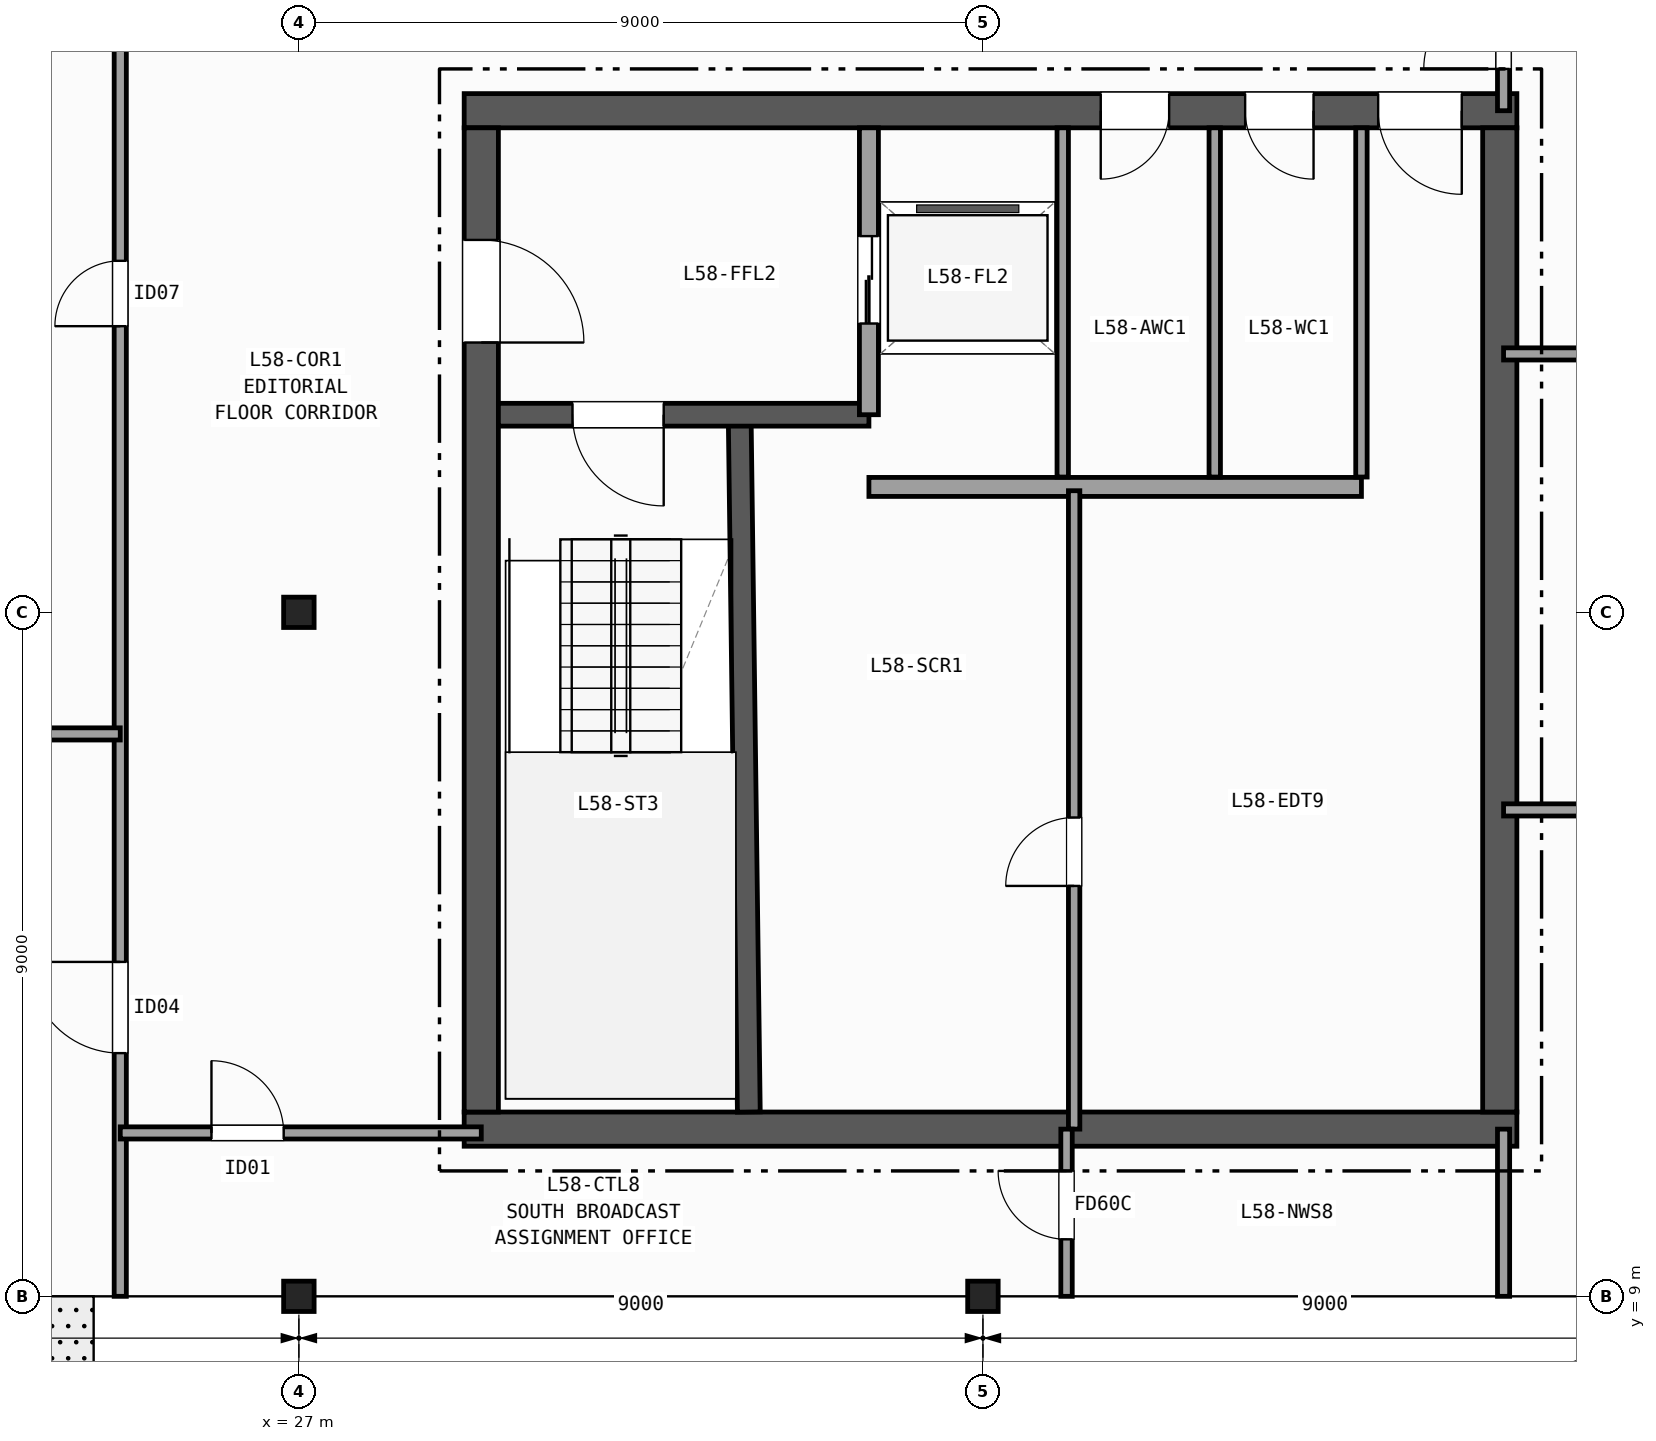
"""IFC4 building model, lengths in metres.
Left out: names, types, materials, properties, quantities, classifications, styles, units other than length and angle.
Written with IfcOpenShell. Run it as: python <this file> out.ifc"""

import sys

from ifc_helpers import new_model, si_unit, direction, frame, frame_2d, origin, origin_2d, place, context, subcontext, project, spatial, rectangle, i_section, extrude, element, fill, save


model = new_model("IFC4")
c1 = context("Model", 3, precision=1e-05, world=origin(), true_north=direction((0.0, 1.0)))
c2 = subcontext(c1, "Body", "Model", "MODEL_VIEW")
j1 = project(units=[si_unit("LENGTHUNIT", "METRE"), si_unit("PLANEANGLEUNIT", "RADIAN")], contexts=[c1])
p1 = place(None, origin())
s1 = spatial("IfcSite", under=j1, at=p1, CompositionType="ELEMENT")
p2 = place(p1, origin())
s2 = spatial("IfcBuilding", under=s1, at=p2, CompositionType="ELEMENT")
p3 = place(p2, frame((0.0, 0.0, 232.1)))
s3 = spatial("IfcBuildingStorey", under=s2, at=p3, CompositionType="ELEMENT", Elevation=232.1)
for number, where, z_axis, x_axis in (
    (1, (27.0, 9.0, 0.0), (0.0, 0.0, 1.0), (1.0, 0.0, 0.0)),
    (2, (27.0, 18.0, 0.0), (0.0, 0.0, 1.0), (1.0, 0.0, 0.0)),
    (3, (36.0, 9.0, 0.0), (0.0, 0.0, 1.0), (1.0, 0.0, 0.0)),
):
    element("IfcColumn", number, at=place(p3, frame(where, z_axis=z_axis, x_axis=x_axis)), inside=s3, PredefinedType="COLUMN", context=c2, shape_type="SweptSolid", body=[
        extrude(i_section(OverallWidth=0.401, OverallDepth=0.399, WebThickness=0.025, FlangeThickness=0.04, FilletRadius=0.015, at=origin_2d()), origin(), (0.0, 0.0, 1.0), 3.7),
    ])
p4 = place(p3, frame((29.175, 11.2, 0.0), z_axis=(0.0, 0.0, 1.0), x_axis=(1.0, 0.0, 0.0)))
e4 = element("IfcWall", 4, at=p4, inside=s3, PredefinedType="SHEAR", context=c2, shape_type="SweptSolid", body=[
    extrude(rectangle(XDim=13.85, YDim=0.45, at=frame_2d((6.925, 0.0))), origin(), (0.0, 0.0, 1.0), 3.37),
])
p5 = place(p3, frame((43.025, 24.6, 0.0), z_axis=(0.0, 0.0, 1.0), x_axis=(-1.0, 0.0, 0.0)))
e5 = element("IfcWall", 5, at=p5, inside=s3, PredefinedType="SHEAR", context=c2, shape_type="SweptSolid", body=[
    extrude(rectangle(XDim=13.85, YDim=0.45, at=frame_2d((6.925, 0.0))), origin(), (0.0, 0.0, 1.0), 3.37),
])
p6 = place(p5, frame((0.725, 0.0, 0.0)))
e6 = element("IfcOpeningElement", 6, at=p6, cuts=e5, PredefinedType="OPENING", context=c2, shape_type="SweptSolid", body=[
    extrude(rectangle(XDim=1.1, YDim=2.15, at=frame_2d((0.55, 1.075))), frame((0.0, 0.235, 0.0), z_axis=(0.0, -1.0, 0.0), x_axis=(1.0, 0.0, 0.0)), (0.0, 0.0, 1.0), 0.47),
])
p7 = place(p5, frame((2.675, 0.0, 0.0)))
e7 = element("IfcOpeningElement", 7, at=p7, cuts=e5, PredefinedType="OPENING", context=c2, shape_type="SweptSolid", body=[
    extrude(rectangle(XDim=0.9, YDim=2.1, at=frame_2d((0.45, 1.05))), frame((0.0, 0.235, 0.0), z_axis=(0.0, -1.0, 0.0), x_axis=(1.0, 0.0, 0.0)), (0.0, 0.0, 1.0), 0.47),
])
p8 = place(p5, frame((4.575, 0.0, 0.0)))
e8 = element("IfcOpeningElement", 8, at=p8, cuts=e5, PredefinedType="OPENING", context=c2, shape_type="SweptSolid", body=[
    extrude(rectangle(XDim=0.9, YDim=2.1, at=frame_2d((0.45, 1.05))), frame((0.0, 0.235, 0.0), z_axis=(0.0, -1.0, 0.0), x_axis=(1.0, 0.0, 0.0)), (0.0, 0.0, 1.0), 0.47),
])
p9 = place(p3, frame((29.4, 24.375, 0.0), z_axis=(0.0, 0.0, 1.0), x_axis=(0.0, -1.0, 0.0)))
e9 = element("IfcWall", 9, at=p9, inside=s3, PredefinedType="SHEAR", context=c2, shape_type="SweptSolid", body=[
    extrude(rectangle(XDim=12.95, YDim=0.45, at=frame_2d((6.475, 0.0))), origin(), (0.0, 0.0, 1.0), 3.37),
])
p10 = place(p9, frame((1.475, 0.0, 0.0)))
e10 = element("IfcOpeningElement", 10, at=p10, cuts=e9, PredefinedType="OPENING", context=c2, shape_type="SweptSolid", body=[
    extrude(rectangle(XDim=1.35, YDim=2.15, at=frame_2d((0.675, 1.075))), frame((0.0, 0.235, 0.0), z_axis=(0.0, -1.0, 0.0), x_axis=(1.0, 0.0, 0.0)), (0.0, 0.0, 1.0), 0.47),
])
p11 = place(p3, frame((42.8, 11.425, 0.0), z_axis=(0.0, 0.0, 1.0), x_axis=(0.0, 1.0, 0.0)))
e11 = element("IfcWall", 11, at=p11, inside=s3, PredefinedType="SHEAR", context=c2, shape_type="SweptSolid", body=[
    extrude(rectangle(XDim=12.95, YDim=0.45, at=frame_2d((6.475, 0.0))), origin(), (0.0, 0.0, 1.0), 3.37),
])
p12 = place(p3, frame((32.92, 11.425, 0.0), z_axis=(0.0, 0.0, 1.0), x_axis=(-0.013135638869, 0.999913723774, 0.0)))
e12 = element("IfcWall", 12, at=p12, inside=s3, PredefinedType="SHEAR", context=c2, shape_type="SweptSolid", body=[
    extrude(rectangle(XDim=9.126, YDim=0.3, at=frame_2d((4.563, 0.0))), origin(), (0.0, 0.0, 1.0), 3.37),
])
p13 = place(p3, frame((34.5, 20.6, 0.0), z_axis=(0.0, 0.0, 1.0), x_axis=(-1.0, 0.0, 0.0)))
e13 = element("IfcWall", 13, at=p13, inside=s3, PredefinedType="SHEAR", context=c2, shape_type="SweptSolid", body=[
    extrude(rectangle(XDim=4.875, YDim=0.3, at=frame_2d((2.438, 0.0))), origin(), (0.0, 0.0, 1.0), 3.37),
])
p14 = place(p13, frame((2.7, 0.0, 0.0)))
e14 = element("IfcOpeningElement", 14, at=p14, cuts=e13, PredefinedType="OPENING", context=c2, shape_type="SweptSolid", body=[
    extrude(rectangle(XDim=1.2, YDim=2.15, at=frame_2d((0.6, 1.075))), frame((0.0, 0.16, 0.0), z_axis=(0.0, -1.0, 0.0), x_axis=(1.0, 0.0, 0.0)), (0.0, 0.0, 1.0), 0.32),
])
p15 = place(p3, frame((34.5, 20.6, 0.0), z_axis=(0.0, 0.0, 1.0), x_axis=(0.0, 1.0, 0.0)))
e15 = element("IfcWall", 15, at=p15, inside=s3, PredefinedType="PARTITIONING", context=c2, shape_type="SweptSolid", body=[
    extrude(rectangle(XDim=3.775, YDim=0.25, at=frame_2d((1.887, 0.0))), origin(), (0.0, 0.0, 1.0), 3.37),
])
p16 = place(p15, frame((1.2, 0.0, 0.0)))
e16 = element("IfcOpeningElement", 16, at=p16, cuts=e15, PredefinedType="OPENING", context=c2, shape_type="SweptSolid", body=[
    extrude(rectangle(XDim=1.15, YDim=2.15, at=frame_2d((0.575, 1.075))), frame((0.0, 0.135, 0.0), z_axis=(0.0, -1.0, 0.0), x_axis=(1.0, 0.0, 0.0)), (0.0, 0.0, 1.0), 0.27),
])
p17 = place(p3, frame((34.5, 19.65, 0.0), z_axis=(0.0, 0.0, 1.0), x_axis=(1.0, 0.0, 0.0)))
e17 = element("IfcWall", 17, at=p17, inside=s3, PredefinedType="PARTITIONING", context=c2, shape_type="SweptSolid", body=[
    extrude(rectangle(XDim=6.48, YDim=0.25, at=frame_2d((3.24, 0.0))), origin(), (0.0, 0.0, 1.0), 3.37),
])
p18 = place(p3, frame((37.2, 11.2, 0.0), z_axis=(0.0, 0.0, 1.0), x_axis=(0.0, 1.0, 0.0)))
e18 = element("IfcWall", 18, at=p18, inside=s3, PredefinedType="PARTITIONING", context=c2, shape_type="SweptSolid", body=[
    extrude(rectangle(XDim=8.4, YDim=0.15, at=frame_2d((4.2, 0.0))), origin(), (0.0, 0.0, 1.0), 2.739),
])
p19 = place(p18, frame((3.2, 0.0, 0.0)))
e19 = element("IfcOpeningElement", 19, at=p19, cuts=e18, PredefinedType="OPENING", context=c2, shape_type="SweptSolid", body=[
    extrude(rectangle(XDim=0.9, YDim=2.1, at=frame_2d((0.45, 1.05))), frame((0.0, 0.085, 0.0), z_axis=(0.0, -1.0, 0.0), x_axis=(1.0, 0.0, 0.0)), (0.0, 0.0, 1.0), 0.17),
])
for number, where, z_axis, x_axis in (
    (20, (37.05, 19.78, 0.0), (0.0, 0.0, 1.0), (0.0, 1.0, 0.0)),
    (21, (39.05, 19.78, 0.0), (0.0, 0.0, 1.0), (0.0, 1.0, 0.0)),
    (22, (40.98, 19.78, 0.0), (0.0, 0.0, 1.0), (0.0, 1.0, 0.0)),
):
    element("IfcWall", number, at=place(p3, frame(where, z_axis=z_axis, x_axis=x_axis)), inside=s3, PredefinedType="PARTITIONING", context=c2, shape_type="SweptSolid", body=[
        extrude(rectangle(XDim=4.595, YDim=0.15, at=frame_2d((2.297, 0.0))), origin(), (0.0, 0.0, 1.0), 3.37),
    ])
p20 = place(p3, frame((24.65, 9.0, 0.0), z_axis=(0.0, 0.0, 1.0), x_axis=(0.0, 1.0, 0.0)))
e23 = element("IfcWall", 23, at=p20, inside=s3, PredefinedType="PARTITIONING", context=c2, shape_type="SweptSolid", body=[
    extrude(rectangle(XDim=19.2, YDim=0.16, at=frame_2d((9.6, 0.0))), origin(), (0.0, 0.0, 1.0), 2.657),
])
p21 = place(p20, frame((3.2, 0.0, 0.0)))
e24 = element("IfcOpeningElement", 24, at=p21, cuts=e23, PredefinedType="OPENING", context=c2, shape_type="SweptSolid", body=[
    extrude(rectangle(XDim=1.2, YDim=2.15, at=frame_2d((0.6, 1.075))), frame((0.0, 0.09, 0.0), z_axis=(0.0, -1.0, 0.0), x_axis=(1.0, 0.0, 0.0)), (0.0, 0.0, 1.0), 0.18),
])
p22 = place(p20, frame((12.765, 0.0, 0.0)))
e25 = element("IfcOpeningElement", 25, at=p22, cuts=e23, PredefinedType="OPENING", context=c2, shape_type="SweptSolid", body=[
    extrude(rectangle(XDim=0.86, YDim=2.05, at=frame_2d((0.43, 1.025))), frame((0.0, 0.09, 0.0), z_axis=(0.0, -1.0, 0.0), x_axis=(1.0, 0.0, 0.0)), (0.0, 0.0, 1.0), 0.18),
])
p23 = place(p3, frame((18.0, 16.4, 0.0), z_axis=(0.0, 0.0, 1.0), x_axis=(1.0, 0.0, 0.0)))
e26 = element("IfcWall", 26, at=p23, inside=s3, PredefinedType="PARTITIONING", context=c2, shape_type="SweptSolid", body=[
    extrude(rectangle(XDim=6.65, YDim=0.16, at=frame_2d((3.325, 0.0))), origin(), (0.0, 0.0, 1.0), 2.742),
])
p24 = place(p3, frame((24.65, 11.15, 0.0), z_axis=(0.0, 0.0, 1.0), x_axis=(1.0, 0.0, 0.0)))
e27 = element("IfcWall", 27, at=p24, inside=s3, PredefinedType="PARTITIONING", context=c2, shape_type="SweptSolid", body=[
    extrude(rectangle(XDim=4.75, YDim=0.16, at=frame_2d((2.375, 0.0))), origin(), (0.0, 0.0, 1.0), 2.742),
])
p25 = place(p24, frame((1.2, 0.0, 0.0)))
e28 = element("IfcOpeningElement", 28, at=p25, cuts=e27, PredefinedType="OPENING", context=c2, shape_type="SweptSolid", body=[
    extrude(rectangle(XDim=0.95, YDim=2.1, at=frame_2d((0.475, 1.05))), frame((0.0, 0.09, 0.0), z_axis=(0.0, -1.0, 0.0), x_axis=(1.0, 0.0, 0.0)), (0.0, 0.0, 1.0), 0.18),
])
p26 = place(p3, frame((37.1, 9.0, 0.0), z_axis=(0.0, 0.0, 1.0), x_axis=(0.0, 1.0, 0.0)))
e29 = element("IfcWall", 29, at=p26, inside=s3, PredefinedType="PARTITIONING", context=c2, shape_type="SweptSolid", body=[
    extrude(rectangle(XDim=2.2, YDim=0.15, at=frame_2d((1.1, 0.0))), origin(), (0.0, 0.0, 1.0), 2.657),
])
p27 = place(p26, frame((0.75, 0.0, 0.0)))
e30 = element("IfcOpeningElement", 30, at=p27, cuts=e29, PredefinedType="OPENING", context=c2, shape_type="SweptSolid", body=[
    extrude(rectangle(XDim=0.9, YDim=2.1, at=frame_2d((0.45, 1.05))), frame((0.0, 0.085, 0.0), z_axis=(0.0, -1.0, 0.0), x_axis=(1.0, 0.0, 0.0)), (0.0, 0.0, 1.0), 0.17),
])
p28 = place(p3, frame((42.85, 9.0, 0.0), z_axis=(0.0, 0.0, 1.0), x_axis=(0.0, 1.0, 0.0)))
e31 = element("IfcWall", 31, at=p28, inside=s3, PredefinedType="PARTITIONING", context=c2, shape_type="SweptSolid", body=[
    extrude(rectangle(XDim=2.2, YDim=0.16, at=frame_2d((1.1, 0.0))), origin(), (0.0, 0.0, 1.0), 2.657),
])
p29 = place(p3, frame((42.85, 24.6, 0.0), z_axis=(0.0, 0.0, 1.0), x_axis=(0.0, 1.0, 0.0)))
e32 = element("IfcWall", 32, at=p29, inside=s3, PredefinedType="PARTITIONING", context=c2, shape_type="SweptSolid", body=[
    extrude(rectangle(XDim=2.4, YDim=0.16, at=frame_2d((1.2, 0.0))), origin(), (0.0, 0.0, 1.0), 2.657),
])
p30 = place(p29, frame((0.55, 0.0, 0.0)))
e33 = element("IfcOpeningElement", 33, at=p30, cuts=e32, PredefinedType="OPENING", context=c2, shape_type="SweptSolid", body=[
    extrude(rectangle(XDim=1.05, YDim=2.15, at=frame_2d((0.525, 1.075))), frame((0.0, 0.09, 0.0), z_axis=(0.0, -1.0, 0.0), x_axis=(1.0, 0.0, 0.0)), (0.0, 0.0, 1.0), 0.18),
])
p31 = place(p3, frame((42.85, 15.4, 0.0), z_axis=(0.0, 0.0, 1.0), x_axis=(1.0, 0.0, 0.0)))
e34 = element("IfcWall", 34, at=p31, inside=s3, PredefinedType="PARTITIONING", context=c2, shape_type="SweptSolid", body=[
    extrude(rectangle(XDim=12.262, YDim=0.16, at=frame_2d((6.131, 0.0))), origin(), (0.0, 0.0, 1.0), 2.739),
])
p32 = place(p31, frame((3.4, 0.0, 0.0)))
e35 = element("IfcOpeningElement", 35, at=p32, cuts=e34, PredefinedType="OPENING", context=c2, shape_type="SweptSolid", body=[
    extrude(rectangle(XDim=1.2, YDim=2.15, at=frame_2d((0.6, 1.075))), frame((0.0, 0.09, 0.0), z_axis=(0.0, -1.0, 0.0), x_axis=(1.0, 0.0, 0.0)), (0.0, 0.0, 1.0), 0.18),
])
p33 = place(p3, frame((42.85, 21.4, 0.0), z_axis=(0.0, 0.0, 1.0), x_axis=(1.0, 0.0, 0.0)))
e36 = element("IfcWall", 36, at=p33, inside=s3, PredefinedType="PARTITIONING", context=c2, shape_type="SweptSolid", body=[
    extrude(rectangle(XDim=12.05, YDim=0.16, at=frame_2d((6.025, 0.0))), origin(), (0.0, 0.0, 1.0), 2.742),
])
p34 = place(p33, frame((3.4, 0.0, 0.0)))
e37 = element("IfcOpeningElement", 37, at=p34, cuts=e36, PredefinedType="OPENING", context=c2, shape_type="SweptSolid", body=[
    extrude(rectangle(XDim=0.86, YDim=2.05, at=frame_2d((0.43, 1.025))), frame((0.0, 0.09, 0.0), z_axis=(0.0, -1.0, 0.0), x_axis=(1.0, 0.0, 0.0)), (0.0, 0.0, 1.0), 0.18),
])
p35 = place(p14, origin())
e38 = element("IfcDoor", 38, at=p35, inside=s3, OperationType="SINGLE_SWING_LEFT", PredefinedType="DOOR", context=c2, shape_type="SweptSolid", body=[
    extrude(rectangle(XDim=1.2, YDim=2.15, at=frame_2d((0.6, 1.075))), frame((0.0, 0.025, 0.0), z_axis=(0.0, -1.0, 0.0), x_axis=(1.0, 0.0, 0.0)), (0.0, 0.0, 1.0), 0.05),
])
fill(e14, e38)
p36 = place(p10, origin())
e39 = element("IfcDoor", 39, at=p36, inside=s3, OperationType="SINGLE_SWING_RIGHT", PredefinedType="DOOR", context=c2, shape_type="SweptSolid", body=[
    extrude(rectangle(XDim=1.35, YDim=2.15, at=frame_2d((0.675, 1.075))), frame((0.0, 0.025, 0.0), z_axis=(0.0, -1.0, 0.0), x_axis=(1.0, 0.0, 0.0)), (0.0, 0.0, 1.0), 0.05),
])
fill(e10, e39)
p37 = place(p6, origin())
e40 = element("IfcDoor", 40, at=p37, inside=s3, OperationType="SINGLE_SWING_LEFT", PredefinedType="DOOR", context=c2, shape_type="SweptSolid", body=[
    extrude(rectangle(XDim=1.1, YDim=2.15, at=frame_2d((0.55, 1.075))), frame((0.0, 0.025, 0.0), z_axis=(0.0, -1.0, 0.0), x_axis=(1.0, 0.0, 0.0)), (0.0, 0.0, 1.0), 0.05),
])
fill(e6, e40)
p38 = place(p7, origin())
e41 = element("IfcDoor", 41, at=p38, inside=s3, OperationType="SINGLE_SWING_LEFT", PredefinedType="DOOR", context=c2, shape_type="SweptSolid", body=[
    extrude(rectangle(XDim=0.9, YDim=2.1, at=frame_2d((0.45, 1.05))), frame((0.0, 0.025, 0.0), z_axis=(0.0, -1.0, 0.0), x_axis=(1.0, 0.0, 0.0)), (0.0, 0.0, 1.0), 0.05),
])
fill(e7, e41)
p39 = place(p8, origin())
e42 = element("IfcDoor", 42, at=p39, inside=s3, OperationType="SINGLE_SWING_RIGHT", PredefinedType="DOOR", context=c2, shape_type="SweptSolid", body=[
    extrude(rectangle(XDim=0.9, YDim=2.1, at=frame_2d((0.45, 1.05))), frame((0.0, 0.025, 0.0), z_axis=(0.0, -1.0, 0.0), x_axis=(1.0, 0.0, 0.0)), (0.0, 0.0, 1.0), 0.05),
])
fill(e8, e42)
p40 = place(p16, origin())
e43 = element("IfcDoor", 43, at=p40, inside=s3, OperationType="DOUBLE_DOOR_SLIDING", PredefinedType="DOOR", context=c2, shape_type="SweptSolid", body=[
    extrude(rectangle(XDim=1.15, YDim=2.15, at=frame_2d((0.575, 1.075))), frame((0.0, 0.025, 0.0), z_axis=(0.0, -1.0, 0.0), x_axis=(1.0, 0.0, 0.0)), (0.0, 0.0, 1.0), 0.05),
])
fill(e16, e43)
p41 = place(p19, origin())
e44 = element("IfcDoor", 44, at=p41, inside=s3, OperationType="SINGLE_SWING_LEFT", PredefinedType="DOOR", context=c2, shape_type="SweptSolid", body=[
    extrude(rectangle(XDim=0.9, YDim=2.1, at=frame_2d((0.45, 1.05))), frame((0.0, 0.025, 0.0), z_axis=(0.0, -1.0, 0.0), x_axis=(1.0, 0.0, 0.0)), (0.0, 0.0, 1.0), 0.05),
])
fill(e19, e44)
p42 = place(p21, origin())
e45 = element("IfcDoor", 45, at=p42, inside=s3, OperationType="SINGLE_SWING_RIGHT", PredefinedType="DOOR", context=c2, shape_type="SweptSolid", body=[
    extrude(rectangle(XDim=1.2, YDim=2.15, at=frame_2d((0.6, 1.075))), frame((0.0, 0.025, 0.0), z_axis=(0.0, -1.0, 0.0), x_axis=(1.0, 0.0, 0.0)), (0.0, 0.0, 1.0), 0.05),
])
fill(e24, e45)
p43 = place(p22, origin())
e46 = element("IfcDoor", 46, at=p43, inside=s3, OperationType="SINGLE_SWING_LEFT", PredefinedType="DOOR", context=c2, shape_type="SweptSolid", body=[
    extrude(rectangle(XDim=0.86, YDim=2.05, at=frame_2d((0.43, 1.025))), frame((0.0, 0.025, 0.0), z_axis=(0.0, -1.0, 0.0), x_axis=(1.0, 0.0, 0.0)), (0.0, 0.0, 1.0), 0.05),
])
fill(e25, e46)
p44 = place(p25, origin())
e47 = element("IfcDoor", 47, at=p44, inside=s3, OperationType="SINGLE_SWING_LEFT", PredefinedType="DOOR", context=c2, shape_type="SweptSolid", body=[
    extrude(rectangle(XDim=0.95, YDim=2.1, at=frame_2d((0.475, 1.05))), frame((0.0, 0.025, 0.0), z_axis=(0.0, -1.0, 0.0), x_axis=(1.0, 0.0, 0.0)), (0.0, 0.0, 1.0), 0.05),
])
fill(e28, e47)
p45 = place(p27, origin())
e48 = element("IfcDoor", 48, at=p45, inside=s3, OperationType="SINGLE_SWING_RIGHT", PredefinedType="DOOR", context=c2, shape_type="SweptSolid", body=[
    extrude(rectangle(XDim=0.9, YDim=2.1, at=frame_2d((0.45, 1.05))), frame((0.0, 0.025, 0.0), z_axis=(0.0, -1.0, 0.0), x_axis=(1.0, 0.0, 0.0)), (0.0, 0.0, 1.0), 0.05),
])
fill(e30, e48)
p46 = place(p30, origin())
e49 = element("IfcDoor", 49, at=p46, inside=s3, OperationType="SINGLE_SWING_LEFT", PredefinedType="DOOR", context=c2, shape_type="SweptSolid", body=[
    extrude(rectangle(XDim=1.05, YDim=2.15, at=frame_2d((0.525, 1.075))), frame((0.0, 0.025, 0.0), z_axis=(0.0, -1.0, 0.0), x_axis=(1.0, 0.0, 0.0)), (0.0, 0.0, 1.0), 0.05),
])
fill(e33, e49)
save(model, sys.argv[1])
